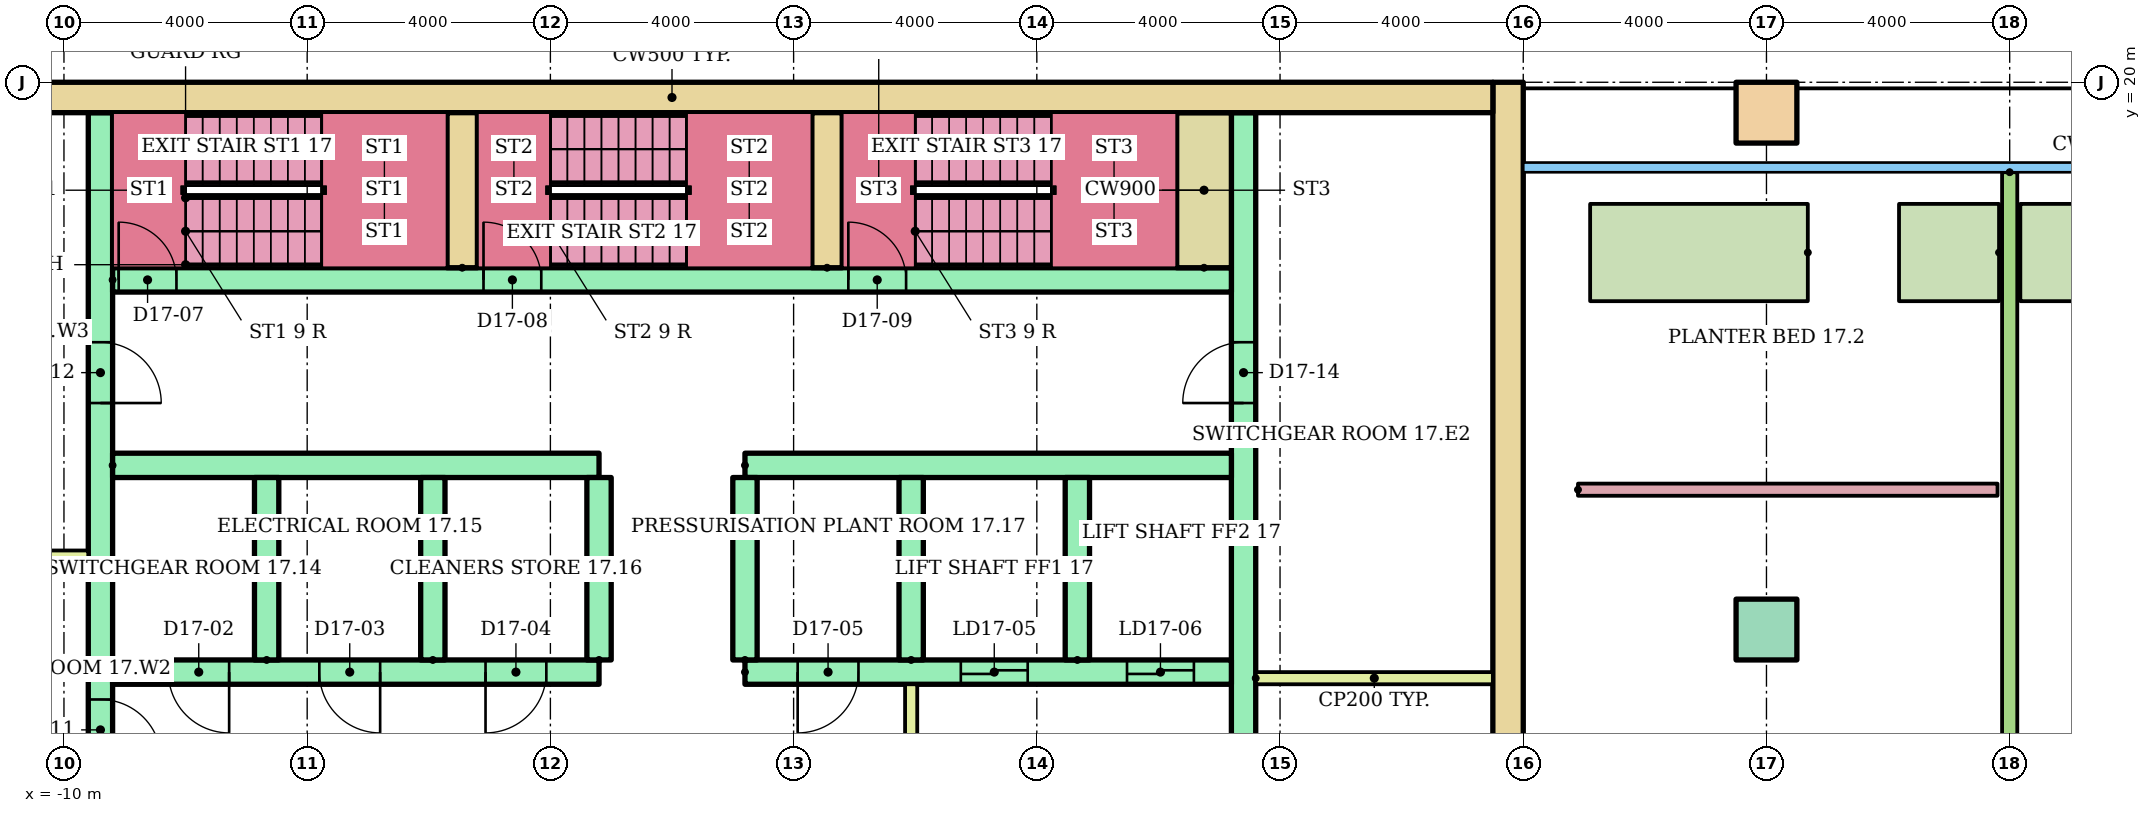
"""IFC4 building model, lengths in metres.
Left out: names, types, materials, properties, quantities, classifications, styles, units other than length and angle.
Written with IfcOpenShell. Run it as: python <this file> out.ifc"""

import sys

from ifc_helpers import new_model, si_unit, direction, frame, frame_2d, origin, origin_2d, place, context, subcontext, project, spatial, rectangle, hollow_rectangle, extrude, element, fill, save


model = new_model("IFC4")
c1 = context("Model", 3, precision=1e-05, world=origin(), true_north=direction((0.0, 1.0)))
c2 = subcontext(c1, "Body", "Model", "MODEL_VIEW")
j1 = project(units=[si_unit("LENGTHUNIT", "METRE"), si_unit("PLANEANGLEUNIT", "RADIAN")], contexts=[c1])
p1 = place(None, origin())
s1 = spatial("IfcSite", under=j1, at=p1, CompositionType="ELEMENT")
p2 = place(p1, origin())
s2 = spatial("IfcBuilding", under=s1, at=p2, CompositionType="ELEMENT")
p3 = place(p2, frame((0.0, 0.0, 64.0)))
s3 = spatial("IfcBuildingStorey", under=s2, at=p3, CompositionType="ELEMENT", Elevation=64.0)
p4 = place(p3, frame((18.0, 11.0, 0.0)))
e1 = element("IfcColumn", 1, at=p4, inside=s3, PredefinedType="COLUMN", context=c2, shape_type="SweptSolid", body=[
    extrude(rectangle(XDim=1.0, YDim=1.0, at=origin_2d()), origin(), (0.0, 0.0, 1.0), 9.6),
])
p5 = place(p3, frame((18.0, 19.5, 0.0)))
e2 = element("IfcColumn", 2, at=p5, inside=s3, PredefinedType="COLUMN", context=c2, shape_type="SweptSolid", body=[
    extrude(hollow_rectangle(XDim=1.0, YDim=1.0, WallThickness=0.05, at=origin_2d()), origin(), (0.0, 0.0, 1.0), 9.6),
])
p6 = place(p3, frame((18.68, 17.2, 0.0), z_axis=(0.0, 0.0, 1.0), x_axis=(-1.0, 0.0, 0.0)))
e3 = element("IfcWall", 3, at=p6, inside=s3, PredefinedType="STANDARD", context=c2, shape_type="SweptSolid", body=[
    extrude(rectangle(XDim=3.58, YDim=1.6, at=frame_2d((1.79, 0.0))), origin(), (0.0, 0.0, 1.0), 0.8),
])
p7 = place(p3, frame((13.75, 3.0, 0.0), z_axis=(0.0, 0.0, 1.0), x_axis=(0.0, 1.0, 0.0)))
e4 = element("IfcWall", 4, at=p7, inside=s3, PredefinedType="SHEAR", context=c2, shape_type="SweptSolid", body=[
    extrude(rectangle(XDim=17.0, YDim=0.5, at=frame_2d((8.5, 0.0))), origin(), (0.0, 0.0, 1.0), 8.8),
])
p8 = place(p3, frame((-13.5, 19.75, 0.0)))
e5 = element("IfcWall", 5, at=p8, inside=s3, PredefinedType="SHEAR", context=c2, shape_type="SweptSolid", body=[
    extrude(rectangle(XDim=27.0, YDim=0.5, at=frame_2d((13.5, 0.0))), origin(), (0.0, 0.0, 1.0), 8.8),
])
p9 = place(p3, frame((-9.4, 6.8, 0.0), z_axis=(0.0, 0.0, 1.0), x_axis=(0.0, 1.0, 0.0)))
e6 = element("IfcWall", 6, at=p9, inside=s3, PredefinedType="SHEAR", context=c2, shape_type="SweptSolid", body=[
    extrude(rectangle(XDim=12.7, YDim=0.4, at=frame_2d((6.35, 0.0))), origin(), (0.0, 0.0, 1.0), 8.8),
])
p10 = place(p9, frame((0.3, 0.0, 0.0)))
e7 = element("IfcOpeningElement", 7, at=p10, cuts=e6, PredefinedType="OPENING", context=c2, shape_type="SweptSolid", body=[
    extrude(rectangle(XDim=1.0, YDim=2.1, at=frame_2d((0.5, 1.05))), frame((0.0, 0.21, 0.0), z_axis=(0.0, -1.0, 0.0), x_axis=(1.0, 0.0, 0.0)), (0.0, 0.0, 1.0), 0.42),
])
p11 = place(p9, frame((2.05, 0.0, 0.0)))
e8 = element("IfcOpeningElement", 8, at=p11, cuts=e6, PredefinedType="OPENING", context=c2, shape_type="SweptSolid", body=[
    extrude(rectangle(XDim=1.0, YDim=2.1, at=frame_2d((0.5, 1.05))), frame((0.0, 0.21, 0.0), z_axis=(0.0, -1.0, 0.0), x_axis=(1.0, 0.0, 0.0)), (0.0, 0.0, 1.0), 0.42),
])
p12 = place(p9, frame((7.925, 0.0, 0.0)))
e9 = element("IfcOpeningElement", 9, at=p12, cuts=e6, PredefinedType="OPENING", context=c2, shape_type="SweptSolid", body=[
    extrude(rectangle(XDim=1.0, YDim=2.1, at=frame_2d((0.5, 1.05))), frame((0.0, 0.21, 0.0), z_axis=(0.0, -1.0, 0.0), x_axis=(1.0, 0.0, 0.0)), (0.0, 0.0, 1.0), 0.42),
])
p13 = place(p3, frame((9.4, 6.8, 0.0), z_axis=(0.0, 0.0, 1.0), x_axis=(0.0, 1.0, 0.0)))
e10 = element("IfcWall", 10, at=p13, inside=s3, PredefinedType="SHEAR", context=c2, shape_type="SweptSolid", body=[
    extrude(rectangle(XDim=12.7, YDim=0.4, at=frame_2d((6.35, 0.0))), origin(), (0.0, 0.0, 1.0), 8.8),
])
p14 = place(p13, frame((1.15, 0.0, 0.0)))
e11 = element("IfcOpeningElement", 11, at=p14, cuts=e10, PredefinedType="OPENING", context=c2, shape_type="SweptSolid", body=[
    extrude(rectangle(XDim=1.0, YDim=2.1, at=frame_2d((0.5, 1.05))), frame((0.0, 0.21, 0.0), z_axis=(0.0, -1.0, 0.0), x_axis=(1.0, 0.0, 0.0)), (0.0, 0.0, 1.0), 0.42),
])
p15 = place(p13, frame((7.925, 0.0, 0.0)))
e12 = element("IfcOpeningElement", 12, at=p15, cuts=e10, PredefinedType="OPENING", context=c2, shape_type="SweptSolid", body=[
    extrude(rectangle(XDim=1.0, YDim=2.1, at=frame_2d((0.5, 1.05))), frame((0.0, 0.21, 0.0), z_axis=(0.0, -1.0, 0.0), x_axis=(1.0, 0.0, 0.0)), (0.0, 0.0, 1.0), 0.42),
])
p16 = place(p3, frame((-9.2, 10.3, 0.0)))
e13 = element("IfcWall", 13, at=p16, inside=s3, PredefinedType="SHEAR", context=c2, shape_type="SweptSolid", body=[
    extrude(rectangle(XDim=8.0, YDim=0.4, at=frame_2d((4.0, 0.0))), origin(), (0.0, 0.0, 1.0), 8.8),
])
p17 = place(p16, frame((0.917, 0.0, 0.0)))
e14 = element("IfcOpeningElement", 14, at=p17, cuts=e13, PredefinedType="OPENING", context=c2, shape_type="SweptSolid", body=[
    extrude(rectangle(XDim=1.0, YDim=2.1, at=frame_2d((0.5, 1.05))), frame((0.0, 0.21, 0.0), z_axis=(0.0, -1.0, 0.0), x_axis=(1.0, 0.0, 0.0)), (0.0, 0.0, 1.0), 0.42),
])
p18 = place(p16, frame((3.4, 0.0, 0.0)))
e15 = element("IfcOpeningElement", 15, at=p18, cuts=e13, PredefinedType="OPENING", context=c2, shape_type="SweptSolid", body=[
    extrude(rectangle(XDim=1.0, YDim=2.1, at=frame_2d((0.5, 1.05))), frame((0.0, 0.21, 0.0), z_axis=(0.0, -1.0, 0.0), x_axis=(1.0, 0.0, 0.0)), (0.0, 0.0, 1.0), 0.42),
])
p19 = place(p16, frame((6.133, 0.0, 0.0)))
e16 = element("IfcOpeningElement", 16, at=p19, cuts=e13, PredefinedType="OPENING", context=c2, shape_type="SweptSolid", body=[
    extrude(rectangle(XDim=1.0, YDim=2.1, at=frame_2d((0.5, 1.05))), frame((0.0, 0.21, 0.0), z_axis=(0.0, -1.0, 0.0), x_axis=(1.0, 0.0, 0.0)), (0.0, 0.0, 1.0), 0.42),
])
p20 = place(p3, frame((-9.2, 13.7, 0.0)))
e17 = element("IfcWall", 17, at=p20, inside=s3, PredefinedType="SHEAR", context=c2, shape_type="SweptSolid", body=[
    extrude(rectangle(XDim=8.0, YDim=0.4, at=frame_2d((4.0, 0.0))), origin(), (0.0, 0.0, 1.0), 8.8),
])
p21 = place(p3, frame((1.2, 10.3, 0.0)))
e18 = element("IfcWall", 18, at=p21, inside=s3, PredefinedType="SHEAR", context=c2, shape_type="SweptSolid", body=[
    extrude(rectangle(XDim=8.0, YDim=0.4, at=frame_2d((4.0, 0.0))), origin(), (0.0, 0.0, 1.0), 8.8),
])
p22 = place(p21, frame((3.55, 0.0, 0.0)))
e19 = element("IfcOpeningElement", 19, at=p22, cuts=e18, PredefinedType="OPENING", context=c2, shape_type="SweptSolid", body=[
    extrude(rectangle(XDim=1.1, YDim=2.1, at=frame_2d((0.55, 1.05))), frame((0.0, 0.21, 0.0), z_axis=(0.0, -1.0, 0.0), x_axis=(1.0, 0.0, 0.0)), (0.0, 0.0, 1.0), 0.42),
])
p23 = place(p21, frame((6.283, 0.0, 0.0)))
e20 = element("IfcOpeningElement", 20, at=p23, cuts=e18, PredefinedType="OPENING", context=c2, shape_type="SweptSolid", body=[
    extrude(rectangle(XDim=1.1, YDim=2.1, at=frame_2d((0.55, 1.05))), frame((0.0, 0.21, 0.0), z_axis=(0.0, -1.0, 0.0), x_axis=(1.0, 0.0, 0.0)), (0.0, 0.0, 1.0), 0.42),
])
p24 = place(p21, frame((0.867, 0.0, 0.0)))
e21 = element("IfcOpeningElement", 21, at=p24, cuts=e18, PredefinedType="OPENING", context=c2, shape_type="SweptSolid", body=[
    extrude(rectangle(XDim=1.0, YDim=2.1, at=frame_2d((0.5, 1.05))), frame((0.0, 0.21, 0.0), z_axis=(0.0, -1.0, 0.0), x_axis=(1.0, 0.0, 0.0)), (0.0, 0.0, 1.0), 0.42),
])
p25 = place(p3, frame((1.2, 13.7, 0.0)))
e22 = element("IfcWall", 22, at=p25, inside=s3, PredefinedType="SHEAR", context=c2, shape_type="SweptSolid", body=[
    extrude(rectangle(XDim=8.0, YDim=0.4, at=frame_2d((4.0, 0.0))), origin(), (0.0, 0.0, 1.0), 8.8),
])
for number, where, z_axis, x_axis in (
    (23, (-6.667, 10.5, 0.0), (0.0, 0.0, 1.0), (0.0, 1.0, 0.0)),
    (24, (-3.933, 10.5, 0.0), (0.0, 0.0, 1.0), (0.0, 1.0, 0.0)),
    (25, (-1.2, 10.5, 0.0), (0.0, 0.0, 1.0), (0.0, 1.0, 0.0)),
    (26, (1.2, 10.5, 0.0), (0.0, 0.0, 1.0), (0.0, 1.0, 0.0)),
    (27, (3.933, 10.5, 0.0), (0.0, 0.0, 1.0), (0.0, 1.0, 0.0)),
    (28, (6.667, 10.5, 0.0), (0.0, 0.0, 1.0), (0.0, 1.0, 0.0)),
):
    element("IfcWall", number, at=place(p3, frame(where, z_axis=z_axis, x_axis=x_axis)), inside=s3, PredefinedType="SHEAR", context=c2, shape_type="SweptSolid", body=[
        extrude(rectangle(XDim=3.0, YDim=0.4, at=frame_2d((1.5, 0.0))), origin(), (0.0, 0.0, 1.0), 8.8),
    ])
p26 = place(p3, frame((3.933, 6.8, 0.0), z_axis=(0.0, 0.0, 1.0), x_axis=(0.0, 1.0, 0.0)))
e29 = element("IfcWall", 29, at=p26, inside=s3, PredefinedType="PARTITIONING", context=c2, shape_type="SweptSolid", body=[
    extrude(rectangle(XDim=3.3, YDim=0.2, at=frame_2d((1.65, 0.0))), origin(), (0.0, 0.0, 1.0), 8.8),
])
p27 = place(p26, frame((1.1, 0.0, 0.0)))
e30 = element("IfcOpeningElement", 30, at=p27, cuts=e29, PredefinedType="OPENING", context=c2, shape_type="SweptSolid", body=[
    extrude(rectangle(XDim=1.1, YDim=2.1, at=frame_2d((0.55, 1.05))), frame((0.0, 0.11, 0.0), z_axis=(0.0, -1.0, 0.0), x_axis=(1.0, 0.0, 0.0)), (0.0, 0.0, 1.0), 0.22),
])
p28 = place(p3, frame((-9.2, 16.75, 0.0)))
e31 = element("IfcWall", 31, at=p28, inside=s3, PredefinedType="SHEAR", context=c2, shape_type="SweptSolid", body=[
    extrude(rectangle(XDim=18.4, YDim=0.4, at=frame_2d((9.2, 0.0))), origin(), (0.0, 0.0, 1.0), 8.8),
])
p29 = place(p28, frame((0.1, 0.0, 0.0)))
e32 = element("IfcOpeningElement", 32, at=p29, cuts=e31, PredefinedType="OPENING", context=c2, shape_type="SweptSolid", body=[
    extrude(rectangle(XDim=0.95, YDim=2.1, at=frame_2d((0.475, 1.05))), frame((0.0, 0.21, 0.0), z_axis=(0.0, -1.0, 0.0), x_axis=(1.0, 0.0, 0.0)), (0.0, 0.0, 1.0), 0.42),
])
p30 = place(p28, frame((6.1, 0.0, 0.0)))
e33 = element("IfcOpeningElement", 33, at=p30, cuts=e31, PredefinedType="OPENING", context=c2, shape_type="SweptSolid", body=[
    extrude(rectangle(XDim=0.95, YDim=2.1, at=frame_2d((0.475, 1.05))), frame((0.0, 0.21, 0.0), z_axis=(0.0, -1.0, 0.0), x_axis=(1.0, 0.0, 0.0)), (0.0, 0.0, 1.0), 0.42),
])
p31 = place(p28, frame((12.1, 0.0, 0.0)))
e34 = element("IfcOpeningElement", 34, at=p31, cuts=e31, PredefinedType="OPENING", context=c2, shape_type="SweptSolid", body=[
    extrude(rectangle(XDim=0.95, YDim=2.1, at=frame_2d((0.475, 1.05))), frame((0.0, 0.21, 0.0), z_axis=(0.0, -1.0, 0.0), x_axis=(1.0, 0.0, 0.0)), (0.0, 0.0, 1.0), 0.42),
])
for number, where, z_axis, x_axis in (
    (35, (-3.45, 16.95, 0.0), (0.0, 0.0, 1.0), (0.0, 1.0, 0.0)),
    (36, (2.55, 16.95, 0.0), (0.0, 0.0, 1.0), (0.0, 1.0, 0.0)),
):
    element("IfcWall", number, at=place(p3, frame(where, z_axis=z_axis, x_axis=x_axis)), inside=s3, PredefinedType="SHEAR", context=c2, shape_type="SweptSolid", body=[
        extrude(rectangle(XDim=2.55, YDim=0.5, at=frame_2d((1.275, 0.0))), origin(), (0.0, 0.0, 1.0), 8.8),
    ])
p32 = place(p3, frame((8.75, 16.95, 0.0), z_axis=(0.0, 0.0, 1.0), x_axis=(0.0, 1.0, 0.0)))
e37 = element("IfcWall", 37, at=p32, inside=s3, PredefinedType="SHEAR", context=c2, shape_type="SweptSolid", body=[
    extrude(rectangle(XDim=2.55, YDim=0.9, at=frame_2d((1.275, 0.0))), origin(), (0.0, 0.0, 1.0), 8.8),
])
for number, where in (
    (38, (-13.5, 12.2, 0.0)),
    (39, (9.6, 10.2, 0.0)),
):
    element("IfcWall", number, at=place(p3, frame(where)), inside=s3, PredefinedType="PARTITIONING", context=c2, shape_type="SweptSolid", body=[
        extrude(rectangle(XDim=3.9, YDim=0.2, at=frame_2d((1.95, 0.0))), origin(), (0.0, 0.0, 1.0), 8.8),
    ])
p33 = place(p3, frame((22.0, 18.521, 0.0), z_axis=(0.0, 0.0, 1.0), x_axis=(0.0, -1.0, 0.0)))
e40 = element("IfcWall", 40, at=p33, inside=s3, PredefinedType="PARTITIONING", context=c2, shape_type="SweptSolid", body=[
    extrude(rectangle(XDim=17.121, YDim=0.25, at=frame_2d((8.561, 0.0))), origin(), (0.0, 0.0, 1.0), 8.8),
])
p34 = place(p3, frame((14.9, 13.3, 0.0)))
e41 = element("IfcWall", 41, at=p34, inside=s3, PredefinedType="PARTITIONING", context=c2, shape_type="SweptSolid", body=[
    extrude(rectangle(XDim=6.9, YDim=0.2, at=frame_2d((3.45, 0.0))), origin(), (0.0, 0.0, 1.0), 0.9),
])
p35 = place(p3, frame((25.18, 17.2, 0.0), z_axis=(0.0, 0.0, 1.0), x_axis=(-1.0, 0.0, 0.0)))
e42 = element("IfcWall", 42, at=p35, inside=s3, PredefinedType="STANDARD", context=c2, shape_type="SweptSolid", body=[
    extrude(rectangle(XDim=3.005, YDim=1.6, at=frame_2d((1.502, 0.0))), origin(), (0.0, 0.0, 1.0), 0.8),
])
p36 = place(p3, frame((21.825, 17.2, 0.0), z_axis=(0.0, 0.0, 1.0), x_axis=(-1.0, 0.0, 0.0)))
e43 = element("IfcWall", 43, at=p36, inside=s3, PredefinedType="STANDARD", context=c2, shape_type="SweptSolid", body=[
    extrude(rectangle(XDim=1.645, YDim=1.6, at=frame_2d((0.823, 0.0))), origin(), (0.0, 0.0, 1.0), 0.8),
])
p37 = place(p22, origin())
e44 = element("IfcDoor", 44, at=p37, inside=s3, OperationType="SLIDING_TO_LEFT", PredefinedType="DOOR", context=c2, shape_type="SweptSolid", body=[
    extrude(rectangle(XDim=1.1, YDim=2.1, at=frame_2d((0.55, 1.05))), frame((0.0, 0.025, 0.0), z_axis=(0.0, -1.0, 0.0), x_axis=(1.0, 0.0, 0.0)), (0.0, 0.0, 1.0), 0.05),
])
fill(e19, e44)
p38 = place(p23, origin())
e45 = element("IfcDoor", 45, at=p38, inside=s3, OperationType="SLIDING_TO_LEFT", PredefinedType="DOOR", context=c2, shape_type="SweptSolid", body=[
    extrude(rectangle(XDim=1.1, YDim=2.1, at=frame_2d((0.55, 1.05))), frame((0.0, 0.025, 0.0), z_axis=(0.0, -1.0, 0.0), x_axis=(1.0, 0.0, 0.0)), (0.0, 0.0, 1.0), 0.05),
])
fill(e20, e45)
p39 = place(p17, frame((1.0, 0.0, 0.0), z_axis=(0.0, 0.0, 1.0), x_axis=(-1.0, 0.0, 0.0)))
e46 = element("IfcDoor", 46, at=p39, inside=s3, OperationType="SINGLE_SWING_RIGHT", PredefinedType="DOOR", context=c2, shape_type="SweptSolid", body=[
    extrude(rectangle(XDim=1.0, YDim=2.1, at=frame_2d((0.5, 1.05))), frame((0.0, 0.025, 0.0), z_axis=(0.0, -1.0, 0.0), x_axis=(1.0, 0.0, 0.0)), (0.0, 0.0, 1.0), 0.05),
])
fill(e14, e46)
p40 = place(p18, frame((1.0, 0.0, 0.0), z_axis=(0.0, 0.0, 1.0), x_axis=(-1.0, 0.0, 0.0)))
e47 = element("IfcDoor", 47, at=p40, inside=s3, OperationType="SINGLE_SWING_RIGHT", PredefinedType="DOOR", context=c2, shape_type="SweptSolid", body=[
    extrude(rectangle(XDim=1.0, YDim=2.1, at=frame_2d((0.5, 1.05))), frame((0.0, 0.025, 0.0), z_axis=(0.0, -1.0, 0.0), x_axis=(1.0, 0.0, 0.0)), (0.0, 0.0, 1.0), 0.05),
])
fill(e15, e47)
p41 = place(p19, frame((1.0, 0.0, 0.0), z_axis=(0.0, 0.0, 1.0), x_axis=(-1.0, 0.0, 0.0)))
e48 = element("IfcDoor", 48, at=p41, inside=s3, OperationType="SINGLE_SWING_LEFT", PredefinedType="DOOR", context=c2, shape_type="SweptSolid", body=[
    extrude(rectangle(XDim=1.0, YDim=2.1, at=frame_2d((0.5, 1.05))), frame((0.0, 0.025, 0.0), z_axis=(0.0, -1.0, 0.0), x_axis=(1.0, 0.0, 0.0)), (0.0, 0.0, 1.0), 0.05),
])
fill(e16, e48)
p42 = place(p24, frame((1.0, 0.0, 0.0), z_axis=(0.0, 0.0, 1.0), x_axis=(-1.0, 0.0, 0.0)))
e49 = element("IfcDoor", 49, at=p42, inside=s3, OperationType="SINGLE_SWING_LEFT", PredefinedType="DOOR", context=c2, shape_type="SweptSolid", body=[
    extrude(rectangle(XDim=1.0, YDim=2.1, at=frame_2d((0.5, 1.05))), frame((0.0, 0.025, 0.0), z_axis=(0.0, -1.0, 0.0), x_axis=(1.0, 0.0, 0.0)), (0.0, 0.0, 1.0), 0.05),
])
fill(e21, e49)
p43 = place(p29, origin())
e50 = element("IfcDoor", 50, at=p43, inside=s3, OperationType="SINGLE_SWING_LEFT", PredefinedType="DOOR", context=c2, shape_type="SweptSolid", body=[
    extrude(rectangle(XDim=0.95, YDim=2.1, at=frame_2d((0.475, 1.05))), frame((0.0, 0.025, 0.0), z_axis=(0.0, -1.0, 0.0), x_axis=(1.0, 0.0, 0.0)), (0.0, 0.0, 1.0), 0.05),
])
fill(e32, e50)
p44 = place(p30, origin())
e51 = element("IfcDoor", 51, at=p44, inside=s3, OperationType="SINGLE_SWING_LEFT", PredefinedType="DOOR", context=c2, shape_type="SweptSolid", body=[
    extrude(rectangle(XDim=0.95, YDim=2.1, at=frame_2d((0.475, 1.05))), frame((0.0, 0.025, 0.0), z_axis=(0.0, -1.0, 0.0), x_axis=(1.0, 0.0, 0.0)), (0.0, 0.0, 1.0), 0.05),
])
fill(e33, e51)
p45 = place(p31, origin())
e52 = element("IfcDoor", 52, at=p45, inside=s3, OperationType="SINGLE_SWING_LEFT", PredefinedType="DOOR", context=c2, shape_type="SweptSolid", body=[
    extrude(rectangle(XDim=0.95, YDim=2.1, at=frame_2d((0.475, 1.05))), frame((0.0, 0.025, 0.0), z_axis=(0.0, -1.0, 0.0), x_axis=(1.0, 0.0, 0.0)), (0.0, 0.0, 1.0), 0.05),
])
fill(e34, e52)
p46 = place(p11, frame((1.0, 0.0, 0.0), z_axis=(0.0, 0.0, 1.0), x_axis=(-1.0, 0.0, 0.0)))
e53 = element("IfcDoor", 53, at=p46, inside=s3, OperationType="SINGLE_SWING_LEFT", PredefinedType="DOOR", context=c2, shape_type="SweptSolid", body=[
    extrude(rectangle(XDim=1.0, YDim=2.1, at=frame_2d((0.5, 1.05))), frame((0.0, 0.025, 0.0), z_axis=(0.0, -1.0, 0.0), x_axis=(1.0, 0.0, 0.0)), (0.0, 0.0, 1.0), 0.05),
])
fill(e8, e53)
p47 = place(p12, frame((1.0, 0.0, 0.0), z_axis=(0.0, 0.0, 1.0), x_axis=(-1.0, 0.0, 0.0)))
e54 = element("IfcDoor", 54, at=p47, inside=s3, OperationType="SINGLE_SWING_LEFT", PredefinedType="DOOR", context=c2, shape_type="SweptSolid", body=[
    extrude(rectangle(XDim=1.0, YDim=2.1, at=frame_2d((0.5, 1.05))), frame((0.0, 0.025, 0.0), z_axis=(0.0, -1.0, 0.0), x_axis=(1.0, 0.0, 0.0)), (0.0, 0.0, 1.0), 0.05),
])
fill(e9, e54)
p48 = place(p15, origin())
e55 = element("IfcDoor", 55, at=p48, inside=s3, OperationType="SINGLE_SWING_LEFT", PredefinedType="DOOR", context=c2, shape_type="SweptSolid", body=[
    extrude(rectangle(XDim=1.0, YDim=2.1, at=frame_2d((0.5, 1.05))), frame((0.0, 0.025, 0.0), z_axis=(0.0, -1.0, 0.0), x_axis=(1.0, 0.0, 0.0)), (0.0, 0.0, 1.0), 0.05),
])
fill(e12, e55)
save(model, sys.argv[1])
